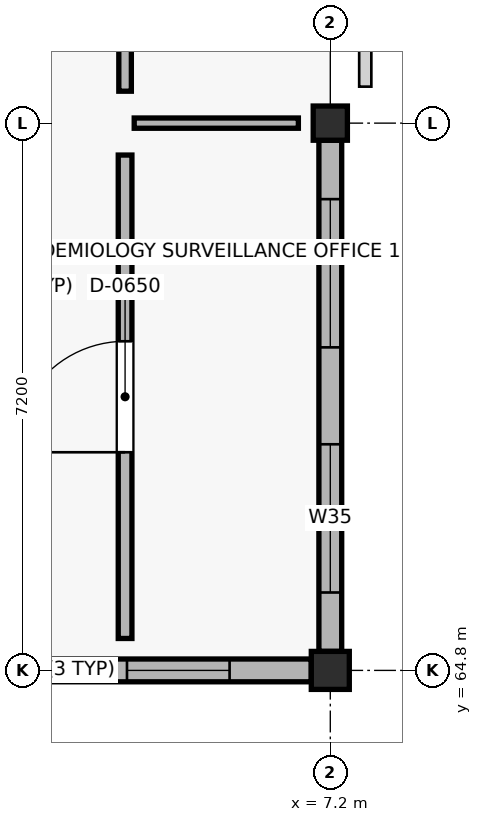
"""IFC4 building model, lengths in metres.
Left out: names, types, materials, properties, quantities, classifications, styles, units other than length and angle.
Written with IfcOpenShell. Run it as: python <this file> out.ifc"""

import sys

from ifc_helpers import new_model, si_unit, direction, frame, frame_2d, origin, origin_2d, place, context, subcontext, project, spatial, rectangle, extrude, element, fill, save


model = new_model("IFC4")
c1 = context("Model", 3, precision=1e-05, world=origin(), true_north=direction((0.0, 1.0)))
c2 = subcontext(c1, "Body", "Model", "MODEL_VIEW")
j1 = project(units=[si_unit("LENGTHUNIT", "METRE"), si_unit("PLANEANGLEUNIT", "RADIAN")], contexts=[c1])
p1 = place(None, origin())
s1 = spatial("IfcSite", under=j1, at=p1, CompositionType="ELEMENT")
p2 = place(p1, origin())
s2 = spatial("IfcBuilding", under=s1, at=p2, CompositionType="ELEMENT")
p3 = place(p2, frame((0.0, 0.0, 21.6)))
s3 = spatial("IfcBuildingStorey", under=s2, at=p3, CompositionType="ELEMENT", Elevation=21.6)
p4 = place(p3, frame((7.2, 64.8, 0.0), z_axis=(0.0, 0.0, 1.0), x_axis=(1.0, 0.0, 0.0)))
e1 = element("IfcColumn", 1, at=p4, inside=s3, PredefinedType="COLUMN", context=c2, shape_type="SweptSolid", body=[
    extrude(rectangle(XDim=0.5, YDim=0.5, at=origin_2d()), origin(), (0.0, 0.0, 1.0), 3.83),
])
p5 = place(p3, frame((7.2, 72.0, 0.0), z_axis=(0.0, 0.0, 1.0), x_axis=(1.0, 0.0, 0.0)))
e2 = element("IfcColumn", 2, at=p5, inside=s3, PredefinedType="COLUMN", context=c2, shape_type="SweptSolid", body=[
    extrude(rectangle(XDim=0.45, YDim=0.45, at=origin_2d()), origin(), (0.0, 0.0, 1.0), 3.83),
])
p6 = place(p3, frame((0.225, 64.8, 0.0), z_axis=(0.0, 0.0, 1.0), x_axis=(1.0, 0.0, 0.0)))
e3 = element("IfcWall", 3, at=p6, inside=s3, PredefinedType="STANDARD", context=c2, shape_type="SweptSolid", body=[
    extrude(rectangle(XDim=6.725, YDim=0.3, at=frame_2d((3.362, 0.0))), origin(), (0.0, 0.0, 1.0), 3.18),
])
p7 = place(p6, frame((1.075, 0.0, 0.9)))
e4 = element("IfcOpeningElement", 4, at=p7, cuts=e3, PredefinedType="OPENING", context=c2, shape_type="SweptSolid", body=[
    extrude(rectangle(XDim=1.35, YDim=1.62, at=frame_2d((0.675, 0.81))), frame((0.0, 0.16, 0.0), z_axis=(0.0, -1.0, 0.0), x_axis=(1.0, 0.0, 0.0)), (0.0, 0.0, 1.0), 0.32),
])
p8 = place(p6, frame((4.3, 0.0, 0.9)))
e5 = element("IfcOpeningElement", 5, at=p8, cuts=e3, PredefinedType="OPENING", context=c2, shape_type="SweptSolid", body=[
    extrude(rectangle(XDim=1.35, YDim=1.62, at=frame_2d((0.675, 0.81))), frame((0.0, 0.16, 0.0), z_axis=(0.0, -1.0, 0.0), x_axis=(1.0, 0.0, 0.0)), (0.0, 0.0, 1.0), 0.32),
])
p9 = place(p3, frame((7.2, 65.05, 0.0), z_axis=(0.0, 0.0, 1.0), x_axis=(0.0, 1.0, 0.0)))
e6 = element("IfcWall", 6, at=p9, inside=s3, PredefinedType="STANDARD", context=c2, shape_type="SweptSolid", body=[
    extrude(rectangle(XDim=6.725, YDim=0.3, at=frame_2d((3.362, 0.0))), origin(), (0.0, 0.0, 1.0), 3.28),
])
p10 = place(p9, frame((0.775, 0.0, 0.9)))
e7 = element("IfcOpeningElement", 7, at=p10, cuts=e6, PredefinedType="OPENING", context=c2, shape_type="SweptSolid", body=[
    extrude(rectangle(XDim=1.95, YDim=1.62, at=frame_2d((0.975, 0.81))), frame((0.0, 0.16, 0.0), z_axis=(0.0, -1.0, 0.0), x_axis=(1.0, 0.0, 0.0)), (0.0, 0.0, 1.0), 0.32),
])
p11 = place(p9, frame((4.0, 0.0, 0.9)))
e8 = element("IfcOpeningElement", 8, at=p11, cuts=e6, PredefinedType="OPENING", context=c2, shape_type="SweptSolid", body=[
    extrude(rectangle(XDim=1.95, YDim=1.62, at=frame_2d((0.975, 0.81))), frame((0.0, 0.16, 0.0), z_axis=(0.0, -1.0, 0.0), x_axis=(1.0, 0.0, 0.0)), (0.0, 0.0, 1.0), 0.32),
])
p12 = place(p3, frame((4.5, 65.22, 0.0), z_axis=(0.0, 0.0, 1.0), x_axis=(0.0, 1.0, 0.0)))
e9 = element("IfcWall", 9, at=p12, inside=s3, PredefinedType="PARTITIONING", context=c2, shape_type="SweptSolid", body=[
    extrude(rectangle(XDim=6.36, YDim=0.18, at=frame_2d((3.18, 0.0))), origin(), (0.0, 0.0, 1.0), 2.97),
])
p13 = place(p12, frame((2.45, 0.0, 0.0)))
e10 = element("IfcOpeningElement", 10, at=p13, cuts=e9, PredefinedType="OPENING", context=c2, shape_type="SweptSolid", body=[
    extrude(rectangle(XDim=1.46, YDim=2.04, at=frame_2d((0.73, 1.02))), frame((0.0, 0.1, 0.0), z_axis=(0.0, -1.0, 0.0), x_axis=(1.0, 0.0, 0.0)), (0.0, 0.0, 1.0), 0.2),
])
p14 = place(p3, frame((4.62, 72.0, 0.0), z_axis=(0.0, 0.0, 1.0), x_axis=(1.0, 0.0, 0.0)))
e11 = element("IfcWall", 11, at=p14, inside=s3, PredefinedType="PARTITIONING", context=c2, shape_type="SweptSolid", body=[
    extrude(rectangle(XDim=2.16, YDim=0.135, at=frame_2d((1.08, 0.0))), origin(), (0.0, 0.0, 1.0), 2.97),
])
p15 = place(p3, frame((4.5, 72.42, 0.0), z_axis=(0.0, 0.0, 1.0), x_axis=(0.0, 1.0, 0.0)))
e12 = element("IfcWall", 12, at=p15, inside=s3, PredefinedType="PARTITIONING", context=c2, shape_type="SweptSolid", body=[
    extrude(rectangle(XDim=6.36, YDim=0.165, at=frame_2d((3.18, 0.0))), origin(), (0.0, 0.0, 1.0), 2.97),
])
p16 = place(p15, frame((2.73, 0.0, 0.0)))
e13 = element("IfcOpeningElement", 13, at=p16, cuts=e12, PredefinedType="OPENING", context=c2, shape_type="SweptSolid", body=[
    extrude(rectangle(XDim=0.9, YDim=2.09, at=frame_2d((0.45, 1.045))), frame((0.0, 0.093, 0.0), z_axis=(0.0, -1.0, 0.0), x_axis=(1.0, 0.0, 0.0)), (0.0, 0.0, 1.0), 0.185),
])
p17 = place(p8, origin())
e14 = element("IfcWindow", 14, at=p17, inside=s3, PartitioningType="SINGLE_PANEL", PredefinedType="WINDOW", context=c2, shape_type="SweptSolid", body=[
    extrude(rectangle(XDim=1.35, YDim=1.62, at=frame_2d((0.675, 0.81))), frame((0.0, 0.03, 0.0), z_axis=(0.0, -1.0, 0.0), x_axis=(1.0, 0.0, 0.0)), (0.0, 0.0, 1.0), 0.06),
])
fill(e5, e14)
p18 = place(p10, origin())
e15 = element("IfcWindow", 15, at=p18, inside=s3, PartitioningType="SINGLE_PANEL", PredefinedType="WINDOW", context=c2, shape_type="SweptSolid", body=[
    extrude(rectangle(XDim=1.95, YDim=1.62, at=frame_2d((0.975, 0.81))), frame((0.0, 0.03, 0.0), z_axis=(0.0, -1.0, 0.0), x_axis=(1.0, 0.0, 0.0)), (0.0, 0.0, 1.0), 0.06),
])
fill(e7, e15)
p19 = place(p11, origin())
e16 = element("IfcWindow", 16, at=p19, inside=s3, PartitioningType="SINGLE_PANEL", PredefinedType="WINDOW", context=c2, shape_type="SweptSolid", body=[
    extrude(rectangle(XDim=1.95, YDim=1.62, at=frame_2d((0.975, 0.81))), frame((0.0, 0.03, 0.0), z_axis=(0.0, -1.0, 0.0), x_axis=(1.0, 0.0, 0.0)), (0.0, 0.0, 1.0), 0.06),
])
fill(e8, e16)
p20 = place(p13, origin())
e17 = element("IfcDoor", 17, at=p20, inside=s3, OperationType="SINGLE_SWING_LEFT", PredefinedType="DOOR", context=c2, shape_type="SweptSolid", body=[
    extrude(rectangle(XDim=1.46, YDim=2.04, at=frame_2d((0.73, 1.02))), frame((0.0, 0.025, 0.0), z_axis=(0.0, -1.0, 0.0), x_axis=(1.0, 0.0, 0.0)), (0.0, 0.0, 1.0), 0.05),
])
fill(e10, e17)
save(model, sys.argv[1])
